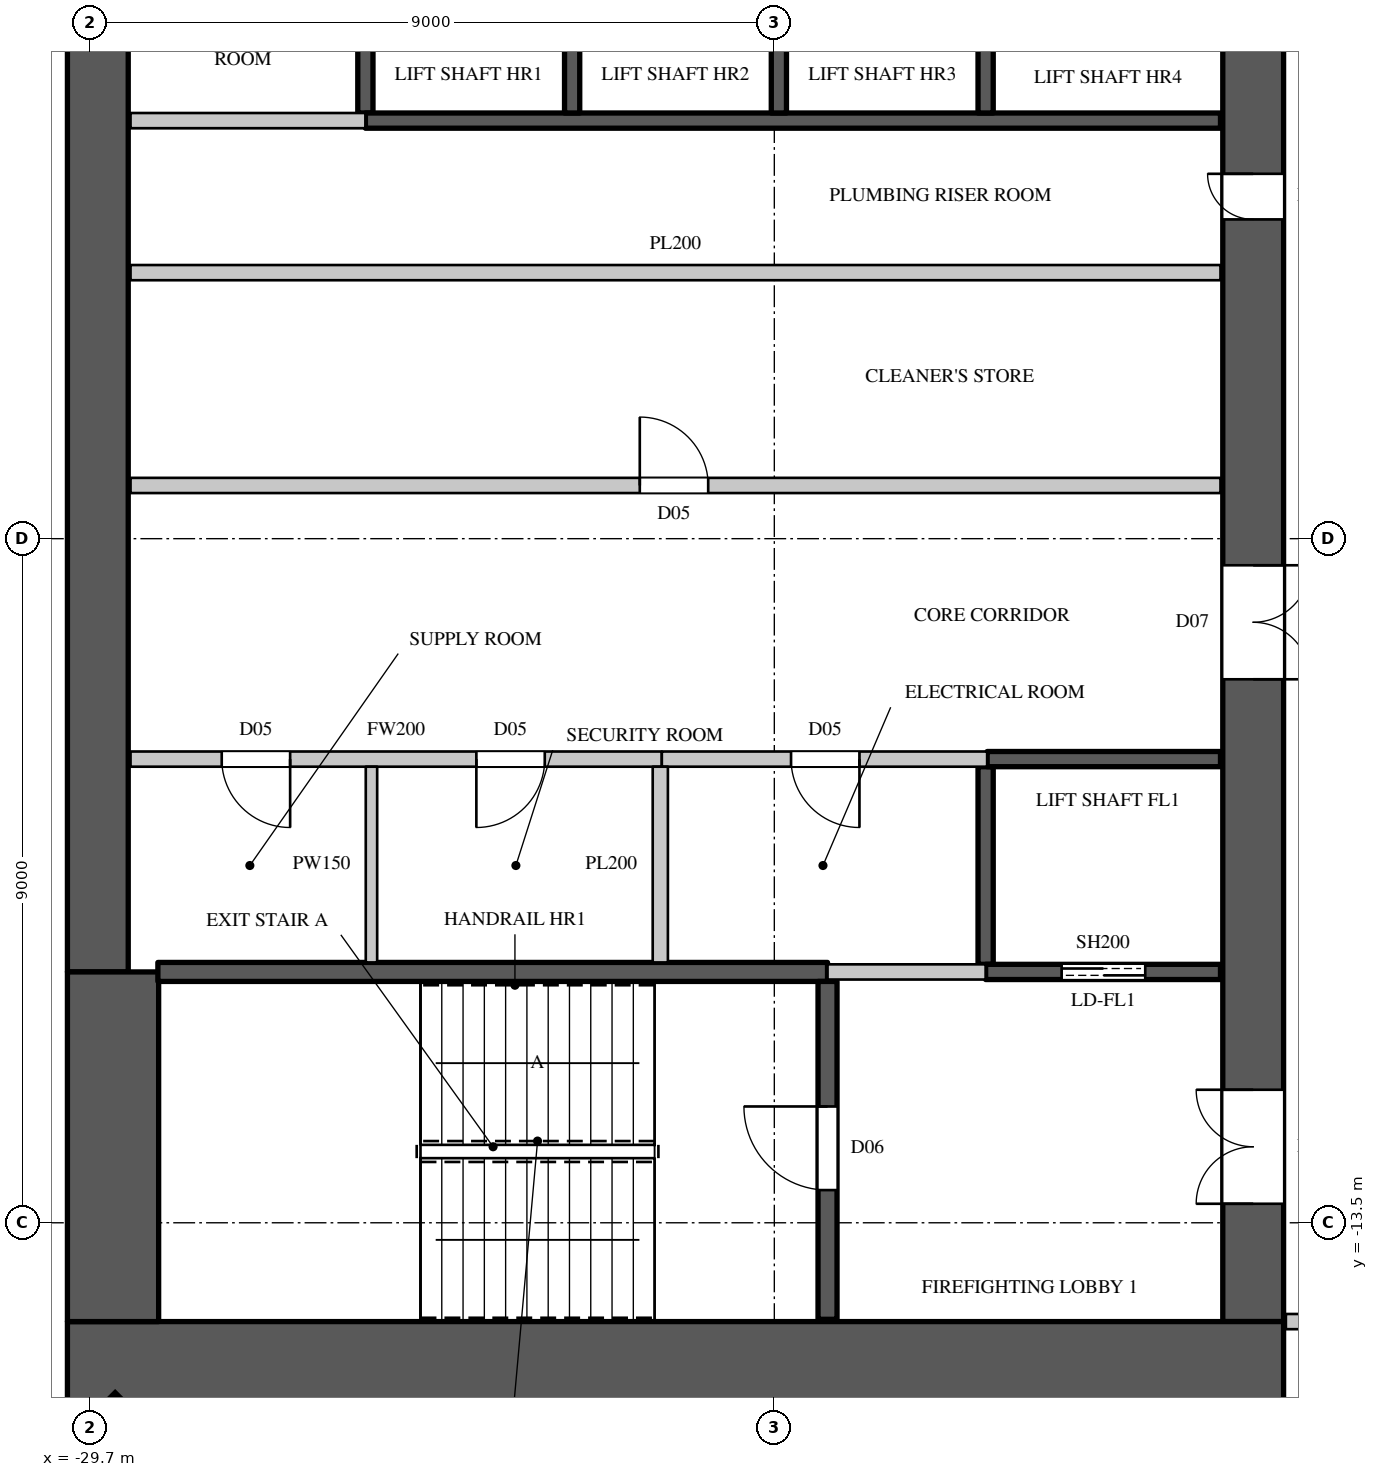
"""IFC4 building model, lengths in metres.
Left out: names, types, materials, properties, quantities, classifications, styles, units other than length and angle.
Written with IfcOpenShell. Run it as: python <this file> out.ifc"""

import sys

from ifc_helpers import new_model, si_unit, direction, frame, frame_2d, origin, origin_2d, place, context, subcontext, project, spatial, rectangle, extrude, element, fill, save


model = new_model("IFC4")
c1 = context("Model", 3, precision=1e-05, world=origin(), true_north=direction((0.0, 1.0)))
c2 = subcontext(c1, "Body", "Model", "MODEL_VIEW")
j1 = project(units=[si_unit("LENGTHUNIT", "METRE"), si_unit("PLANEANGLEUNIT", "RADIAN")], contexts=[c1])
p1 = place(None, origin())
s1 = spatial("IfcSite", under=j1, at=p1, CompositionType="ELEMENT")
p2 = place(p1, origin())
s2 = spatial("IfcBuilding", under=s1, at=p2, CompositionType="ELEMENT")
p3 = place(p2, frame((0.0, 0.0, 172.8)))
s3 = spatial("IfcBuildingStorey", under=s2, at=p3, CompositionType="ELEMENT", Elevation=172.8)
p4 = place(p3, frame((-29.443, -16.443, 0.0), z_axis=(0.0, 0.0, 1.0), x_axis=(0.707106781187, -0.707106781187, 0.0)))
e1 = element("IfcColumn", 1, at=p4, inside=s3, PredefinedType="COLUMN", context=c2, shape_type="SweptSolid", body=[
    extrude(rectangle(XDim=0.9, YDim=1.1, at=origin_2d()), origin(), (0.0, 0.0, 1.0), 4.1),
])
p5 = place(p3, frame((-30.0, -15.4, 0.0), z_axis=(0.0, 0.0, 1.0), x_axis=(1.0, 0.0, 0.0)))
e2 = element("IfcWall", 2, at=p5, inside=s3, PredefinedType="SHEAR", context=c2, shape_type="SweptSolid", body=[
    extrude(rectangle(XDim=16.0, YDim=1.2, at=frame_2d((8.0, 0.0))), origin(), (0.0, 0.0, 1.0), 4.1),
])
p6 = place(p3, frame((-14.4, -14.8, 0.0), z_axis=(0.0, 0.0, 1.0), x_axis=(0.0, 1.0, 0.0)))
e3 = element("IfcWall", 3, at=p6, inside=s3, PredefinedType="SHEAR", context=c2, shape_type="SweptSolid", body=[
    extrude(rectangle(XDim=29.6, YDim=0.8, at=frame_2d((14.8, 0.0))), origin(), (0.0, 0.0, 1.0), 4.1),
])
p7 = place(p6, frame((1.55, 0.0, 0.0)))
e4 = element("IfcOpeningElement", 4, at=p7, cuts=e3, PredefinedType="OPENING", context=c2, shape_type="SweptSolid", body=[
    extrude(rectangle(XDim=1.5, YDim=2.4, at=frame_2d((0.75, 1.2))), frame((0.0, 0.41, 0.0), z_axis=(0.0, -1.0, 0.0), x_axis=(1.0, 0.0, 0.0)), (0.0, 0.0, 1.0), 0.82),
])
p8 = place(p6, frame((26.55, 0.0, 0.0)))
e5 = element("IfcOpeningElement", 5, at=p8, cuts=e3, PredefinedType="OPENING", context=c2, shape_type="SweptSolid", body=[
    extrude(rectangle(XDim=1.5, YDim=2.4, at=frame_2d((0.75, 1.2))), frame((0.0, 0.41, 0.0), z_axis=(0.0, -1.0, 0.0), x_axis=(1.0, 0.0, 0.0)), (0.0, 0.0, 1.0), 0.82),
])
p9 = place(p6, frame((8.45, 0.0, 0.0)))
e6 = element("IfcOpeningElement", 6, at=p9, cuts=e3, PredefinedType="OPENING", context=c2, shape_type="SweptSolid", body=[
    extrude(rectangle(XDim=1.5, YDim=2.4, at=frame_2d((0.75, 1.2))), frame((0.0, 0.41, 0.0), z_axis=(0.0, -1.0, 0.0), x_axis=(1.0, 0.0, 0.0)), (0.0, 0.0, 1.0), 0.82),
])
p10 = place(p6, frame((19.65, 0.0, 0.0)))
e7 = element("IfcOpeningElement", 7, at=p10, cuts=e3, PredefinedType="OPENING", context=c2, shape_type="SweptSolid", body=[
    extrude(rectangle(XDim=1.5, YDim=2.4, at=frame_2d((0.75, 1.2))), frame((0.0, 0.41, 0.0), z_axis=(0.0, -1.0, 0.0), x_axis=(1.0, 0.0, 0.0)), (0.0, 0.0, 1.0), 0.82),
])
p11 = place(p6, frame((14.5, 0.0, 0.0)))
e8 = element("IfcOpeningElement", 8, at=p11, cuts=e3, PredefinedType="OPENING", context=c2, shape_type="SweptSolid", body=[
    extrude(rectangle(XDim=0.6, YDim=2.0, at=frame_2d((0.3, 1.0))), frame((0.0, 0.41, 0.0), z_axis=(0.0, -1.0, 0.0), x_axis=(1.0, 0.0, 0.0)), (0.0, 0.0, 1.0), 0.82),
])
p12 = place(p3, frame((-29.6, -10.2, 0.0), z_axis=(0.0, 0.0, 1.0), x_axis=(0.0, 1.0, 0.0)))
e9 = element("IfcWall", 9, at=p12, inside=s3, PredefinedType="SHEAR", context=c2, shape_type="SweptSolid", body=[
    extrude(rectangle(XDim=20.4, YDim=0.8, at=frame_2d((10.2, 0.0))), origin(), (0.0, 0.0, 1.0), 4.1),
])
p13 = place(p3, frame((-29.4, -14.8, 0.0), z_axis=(0.0, 0.0, 1.0), x_axis=(0.0, 1.0, 0.0)))
e10 = element("IfcWall", 10, at=p13, inside=s3, PredefinedType="SHEAR", context=c2, shape_type="SweptSolid", body=[
    extrude(rectangle(XDim=4.6, YDim=1.2, at=frame_2d((2.3, 0.0))), origin(), (0.0, 0.0, 1.0), 4.1),
])
p14 = place(p3, frame((-29.17, -7.4, 0.0), z_axis=(0.0, 0.0, 1.0), x_axis=(1.0, 0.0, 0.0)))
e11 = element("IfcWall", 11, at=p14, inside=s3, PredefinedType="PARTITIONING", context=c2, shape_type="SweptSolid", body=[
    extrude(rectangle(XDim=6.99, YDim=0.2, at=frame_2d((3.495, 0.0))), origin(), (0.0, 0.0, 1.0), 3.8),
])
p15 = place(p14, frame((1.2, 0.0, 0.0)))
e12 = element("IfcOpeningElement", 12, at=p15, cuts=e11, PredefinedType="OPENING", context=c2, shape_type="SweptSolid", body=[
    extrude(rectangle(XDim=0.9, YDim=2.2, at=frame_2d((0.45, 1.1))), frame((0.0, 0.11, 0.0), z_axis=(0.0, -1.0, 0.0), x_axis=(1.0, 0.0, 0.0)), (0.0, 0.0, 1.0), 0.22),
])
p16 = place(p14, frame((4.55, 0.0, 0.0)))
e13 = element("IfcOpeningElement", 13, at=p16, cuts=e11, PredefinedType="OPENING", context=c2, shape_type="SweptSolid", body=[
    extrude(rectangle(XDim=0.9, YDim=2.2, at=frame_2d((0.45, 1.1))), frame((0.0, 0.11, 0.0), z_axis=(0.0, -1.0, 0.0), x_axis=(1.0, 0.0, 0.0)), (0.0, 0.0, 1.0), 0.22),
])
p17 = place(p3, frame((-29.17, -3.8, 0.0), z_axis=(0.0, 0.0, 1.0), x_axis=(1.0, 0.0, 0.0)))
e14 = element("IfcWall", 14, at=p17, inside=s3, PredefinedType="PARTITIONING", context=c2, shape_type="SweptSolid", body=[
    extrude(rectangle(XDim=14.34, YDim=0.2, at=frame_2d((7.17, 0.0))), origin(), (0.0, 0.0, 1.0), 3.8),
])
p18 = place(p17, frame((6.7, 0.0, 0.0)))
e15 = element("IfcOpeningElement", 15, at=p18, cuts=e14, PredefinedType="OPENING", context=c2, shape_type="SweptSolid", body=[
    extrude(rectangle(XDim=0.9, YDim=2.2, at=frame_2d((0.45, 1.1))), frame((0.0, 0.11, 0.0), z_axis=(0.0, -1.0, 0.0), x_axis=(1.0, 0.0, 0.0)), (0.0, 0.0, 1.0), 0.22),
])
p19 = place(p3, frame((-13.97, -14.8, 0.0), z_axis=(0.0, 0.0, 1.0), x_axis=(1.0, 0.0, 0.0)))
e16 = element("IfcWall", 16, at=p19, inside=s3, PredefinedType="PARTITIONING", context=c2, shape_type="SweptSolid", body=[
    extrude(rectangle(XDim=2.87, YDim=0.2, at=frame_2d((1.435, 0.0))), origin(), (0.0, 0.0, 1.0), 3.8),
])
p20 = place(p3, frame((-26.0, -10.075, 0.0), z_axis=(0.0, 0.0, 1.0), x_axis=(0.0, 1.0, 0.0)))
e17 = element("IfcWall", 17, at=p20, inside=s3, PredefinedType="PARTITIONING", context=c2, shape_type="SweptSolid", body=[
    extrude(rectangle(XDim=2.575, YDim=0.15, at=frame_2d((1.288, 0.0))), origin(), (0.0, 0.0, 1.0), 3.8),
])
p21 = place(p3, frame((-29.17, -1.0, 0.0), z_axis=(0.0, 0.0, 1.0), x_axis=(1.0, 0.0, 0.0)))
e18 = element("IfcWall", 18, at=p21, inside=s3, PredefinedType="PARTITIONING", context=c2, shape_type="SweptSolid", body=[
    extrude(rectangle(XDim=14.34, YDim=0.2, at=frame_2d((7.17, 0.0))), origin(), (0.0, 0.0, 1.0), 3.8),
])
p22 = place(p3, frame((-29.17, 1.0, 0.0), z_axis=(0.0, 0.0, 1.0), x_axis=(1.0, 0.0, 0.0)))
e19 = element("IfcWall", 19, at=p22, inside=s3, PredefinedType="PARTITIONING", context=c2, shape_type="SweptSolid", body=[
    extrude(rectangle(XDim=3.09, YDim=0.2, at=frame_2d((1.545, 0.0))), origin(), (0.0, 0.0, 1.0), 3.8),
])
p23 = place(p3, frame((-22.18, -7.4, 0.0), z_axis=(0.0, 0.0, 1.0), x_axis=(1.0, 0.0, 0.0)))
e20 = element("IfcWall", 20, at=p23, inside=s3, PredefinedType="PARTITIONING", context=c2, shape_type="SweptSolid", body=[
    extrude(rectangle(XDim=4.28, YDim=0.2, at=frame_2d((2.14, 0.0))), origin(), (0.0, 0.0, 1.0), 3.8),
])
p24 = place(p23, frame((1.7, 0.0, 0.0)))
e21 = element("IfcOpeningElement", 21, at=p24, cuts=e20, PredefinedType="OPENING", context=c2, shape_type="SweptSolid", body=[
    extrude(rectangle(XDim=0.9, YDim=2.2, at=frame_2d((0.45, 1.1))), frame((0.0, 0.11, 0.0), z_axis=(0.0, -1.0, 0.0), x_axis=(1.0, 0.0, 0.0)), (0.0, 0.0, 1.0), 0.22),
])
p25 = place(p3, frame((-22.2, -10.075, 0.0), z_axis=(0.0, 0.0, 1.0), x_axis=(0.0, 1.0, 0.0)))
e22 = element("IfcWall", 22, at=p25, inside=s3, PredefinedType="PARTITIONING", context=c2, shape_type="SweptSolid", body=[
    extrude(rectangle(XDim=2.575, YDim=0.2, at=frame_2d((1.288, 0.0))), origin(), (0.0, 0.0, 1.0), 3.8),
])
p26 = place(p3, frame((-20.0, -10.2, 0.0), z_axis=(0.0, 0.0, 1.0), x_axis=(1.0, 0.0, 0.0)))
e23 = element("IfcWall", 23, at=p26, inside=s3, PredefinedType="PARTITIONING", context=c2, shape_type="SweptSolid", body=[
    extrude(rectangle(XDim=2.08, YDim=0.2, at=frame_2d((1.04, 0.0))), origin(), (0.0, 0.0, 1.0), 3.8),
])
p27 = place(p3, frame((-26.08, 1.1, 0.0), z_axis=(0.0, 0.0, 1.0), x_axis=(0.0, 1.0, 0.0)))
e24 = element("IfcWall", 24, at=p27, inside=s3, PredefinedType="SHEAR", context=c2, shape_type="SweptSolid", body=[
    extrude(rectangle(XDim=2.6, YDim=0.2, at=frame_2d((1.3, 0.0))), origin(), (0.0, 0.0, 1.0), 3.8),
])
p28 = place(p3, frame((-26.08, 1.0, 0.0), z_axis=(0.0, 0.0, 1.0), x_axis=(1.0, 0.0, 0.0)))
e25 = element("IfcWall", 25, at=p28, inside=s3, PredefinedType="SHEAR", context=c2, shape_type="SweptSolid", body=[
    extrude(rectangle(XDim=11.25, YDim=0.2, at=frame_2d((5.625, 0.0))), origin(), (0.0, 0.0, 1.0), 3.8),
])
for number, where, z_axis, x_axis in (
    (26, (-23.36, 1.1, 0.0), (0.0, 0.0, 1.0), (0.0, 1.0, 0.0)),
    (27, (-20.64, 1.1, 0.0), (0.0, 0.0, 1.0), (0.0, 1.0, 0.0)),
):
    element("IfcWall", number, at=place(p3, frame(where, z_axis=z_axis, x_axis=x_axis)), inside=s3, PredefinedType="SHEAR", context=c2, shape_type="SweptSolid", body=[
        extrude(rectangle(XDim=2.6, YDim=0.2, at=frame_2d((1.3, 0.0))), origin(), (0.0, 0.0, 1.0), 4.1),
    ])
p29 = place(p3, frame((-17.92, -10.1, 0.0), z_axis=(0.0, 0.0, 1.0), x_axis=(0.0, 1.0, 0.0)))
e28 = element("IfcWall", 28, at=p29, inside=s3, PredefinedType="SHEAR", context=c2, shape_type="SweptSolid", body=[
    extrude(rectangle(XDim=2.6, YDim=0.2, at=frame_2d((1.3, 0.0))), origin(), (0.0, 0.0, 1.0), 3.8),
])
p30 = place(p3, frame((-17.92, -10.2, 0.0), z_axis=(0.0, 0.0, 1.0), x_axis=(1.0, 0.0, 0.0)))
e29 = element("IfcWall", 29, at=p30, inside=s3, PredefinedType="SHEAR", context=c2, shape_type="SweptSolid", body=[
    extrude(rectangle(XDim=3.09, YDim=0.2, at=frame_2d((1.545, 0.0))), origin(), (0.0, 0.0, 1.0), 3.8),
])
p31 = place(p30, frame((1.0, 0.0, 0.0)))
e30 = element("IfcOpeningElement", 30, at=p31, cuts=e29, PredefinedType="OPENING", context=c2, shape_type="SweptSolid", body=[
    extrude(rectangle(XDim=1.1, YDim=2.2, at=frame_2d((0.55, 1.1))), frame((0.0, 0.11, 0.0), z_axis=(0.0, -1.0, 0.0), x_axis=(1.0, 0.0, 0.0)), (0.0, 0.0, 1.0), 0.22),
])
p32 = place(p3, frame((-17.9, -7.4, 0.0), z_axis=(0.0, 0.0, 1.0), x_axis=(1.0, 0.0, 0.0)))
e31 = element("IfcWall", 31, at=p32, inside=s3, PredefinedType="SHEAR", context=c2, shape_type="SweptSolid", body=[
    extrude(rectangle(XDim=3.07, YDim=0.2, at=frame_2d((1.535, 0.0))), origin(), (0.0, 0.0, 1.0), 3.8),
])
p33 = place(p3, frame((-17.92, 1.1, 0.0), z_axis=(0.0, 0.0, 1.0), x_axis=(0.0, 1.0, 0.0)))
e32 = element("IfcWall", 32, at=p33, inside=s3, PredefinedType="SHEAR", context=c2, shape_type="SweptSolid", body=[
    extrude(rectangle(XDim=2.6, YDim=0.2, at=frame_2d((1.3, 0.0))), origin(), (0.0, 0.0, 1.0), 4.1),
])
p34 = place(p3, frame((-28.81, -10.2, 0.0), z_axis=(0.0, 0.0, 1.0), x_axis=(1.0, 0.0, 0.0)))
e33 = element("IfcWall", 33, at=p34, inside=s3, PredefinedType="SHEAR", context=c2, shape_type="SweptSolid", body=[
    extrude(rectangle(XDim=8.81, YDim=0.25, at=frame_2d((4.405, 0.0))), origin(), (0.0, 0.0, 1.0), 3.8),
])
p35 = place(p3, frame((-20.0, -14.77, 0.0), z_axis=(0.0, 0.0, 1.0), x_axis=(0.0, 1.0, 0.0)))
e34 = element("IfcWall", 34, at=p35, inside=s3, PredefinedType="SHEAR", context=c2, shape_type="SweptSolid", body=[
    extrude(rectangle(XDim=4.445, YDim=0.25, at=frame_2d((2.223, 0.0))), origin(), (0.0, 0.0, 1.0), 3.8),
])
p36 = place(p35, frame((1.7, 0.0, 0.0)))
e35 = element("IfcOpeningElement", 35, at=p36, cuts=e34, PredefinedType="OPENING", context=c2, shape_type="SweptSolid", body=[
    extrude(rectangle(XDim=1.1, YDim=2.2, at=frame_2d((0.55, 1.1))), frame((0.0, 0.135, 0.0), z_axis=(0.0, -1.0, 0.0), x_axis=(1.0, 0.0, 0.0)), (0.0, 0.0, 1.0), 0.27),
])
p37 = place(p36, origin())
e36 = element("IfcDoor", 36, at=p37, inside=s3, OperationType="SINGLE_SWING_RIGHT", PredefinedType="DOOR", context=c2, shape_type="SweptSolid", body=[
    extrude(rectangle(XDim=1.1, YDim=2.2, at=frame_2d((0.55, 1.1))), frame((0.0, 0.025, 0.0), z_axis=(0.0, -1.0, 0.0), x_axis=(1.0, 0.0, 0.0)), (0.0, 0.0, 1.0), 0.05),
])
fill(e35, e36)
p38 = place(p15, origin())
e37 = element("IfcDoor", 37, at=p38, inside=s3, OperationType="SINGLE_SWING_LEFT", PredefinedType="DOOR", context=c2, shape_type="SweptSolid", body=[
    extrude(rectangle(XDim=0.9, YDim=2.2, at=frame_2d((0.45, 1.1))), frame((0.0, 0.025, 0.0), z_axis=(0.0, -1.0, 0.0), x_axis=(1.0, 0.0, 0.0)), (0.0, 0.0, 1.0), 0.05),
])
fill(e12, e37)
p39 = place(p16, origin())
e38 = element("IfcDoor", 38, at=p39, inside=s3, OperationType="SINGLE_SWING_RIGHT", PredefinedType="DOOR", context=c2, shape_type="SweptSolid", body=[
    extrude(rectangle(XDim=0.9, YDim=2.2, at=frame_2d((0.45, 1.1))), frame((0.0, 0.025, 0.0), z_axis=(0.0, -1.0, 0.0), x_axis=(1.0, 0.0, 0.0)), (0.0, 0.0, 1.0), 0.05),
])
fill(e13, e38)
p40 = place(p24, origin())
e39 = element("IfcDoor", 39, at=p40, inside=s3, OperationType="SINGLE_SWING_LEFT", PredefinedType="DOOR", context=c2, shape_type="SweptSolid", body=[
    extrude(rectangle(XDim=0.9, YDim=2.2, at=frame_2d((0.45, 1.1))), frame((0.0, 0.025, 0.0), z_axis=(0.0, -1.0, 0.0), x_axis=(1.0, 0.0, 0.0)), (0.0, 0.0, 1.0), 0.05),
])
fill(e21, e39)
p41 = place(p18, origin())
e40 = element("IfcDoor", 40, at=p41, inside=s3, OperationType="SINGLE_SWING_LEFT", PredefinedType="DOOR", context=c2, shape_type="SweptSolid", body=[
    extrude(rectangle(XDim=0.9, YDim=2.2, at=frame_2d((0.45, 1.1))), frame((0.0, 0.025, 0.0), z_axis=(0.0, -1.0, 0.0), x_axis=(1.0, 0.0, 0.0)), (0.0, 0.0, 1.0), 0.05),
])
fill(e15, e40)
p42 = place(p31, origin())
e41 = element("IfcDoor", 41, at=p42, inside=s3, OperationType="DOUBLE_DOOR_SLIDING", PredefinedType="DOOR", context=c2, shape_type="SweptSolid", body=[
    extrude(rectangle(XDim=1.1, YDim=2.2, at=frame_2d((0.55, 1.1))), frame((0.0, 0.025, 0.0), z_axis=(0.0, -1.0, 0.0), x_axis=(1.0, 0.0, 0.0)), (0.0, 0.0, 1.0), 0.05),
])
fill(e30, e41)
p43 = place(p7, origin())
e42 = element("IfcDoor", 42, at=p43, inside=s3, OperationType="DOUBLE_DOOR_SINGLE_SWING", PredefinedType="DOOR", context=c2, shape_type="SweptSolid", body=[
    extrude(rectangle(XDim=1.5, YDim=2.4, at=frame_2d((0.75, 1.2))), frame((0.0, 0.395, 0.0), z_axis=(0.0, -1.0, 0.0), x_axis=(1.0, 0.0, 0.0)), (0.0, 0.0, 1.0), 0.05),
])
fill(e4, e42)
p44 = place(p9, origin())
e43 = element("IfcDoor", 43, at=p44, inside=s3, OperationType="DOUBLE_DOOR_SINGLE_SWING", PredefinedType="DOOR", context=c2, shape_type="SweptSolid", body=[
    extrude(rectangle(XDim=1.5, YDim=2.4, at=frame_2d((0.75, 1.2))), frame((0.0, -0.345, 0.0), z_axis=(0.0, -1.0, 0.0), x_axis=(1.0, 0.0, 0.0)), (0.0, 0.0, 1.0), 0.05),
])
fill(e6, e43)
p45 = place(p11, origin())
e44 = element("IfcDoor", 44, at=p45, inside=s3, OperationType="SINGLE_SWING_RIGHT", PredefinedType="DOOR", context=c2, shape_type="SweptSolid", body=[
    extrude(rectangle(XDim=0.6, YDim=2.0, at=frame_2d((0.3, 1.0))), frame((0.0, 0.395, 0.0), z_axis=(0.0, -1.0, 0.0), x_axis=(1.0, 0.0, 0.0)), (0.0, 0.0, 1.0), 0.05),
])
fill(e8, e44)
save(model, sys.argv[1])
